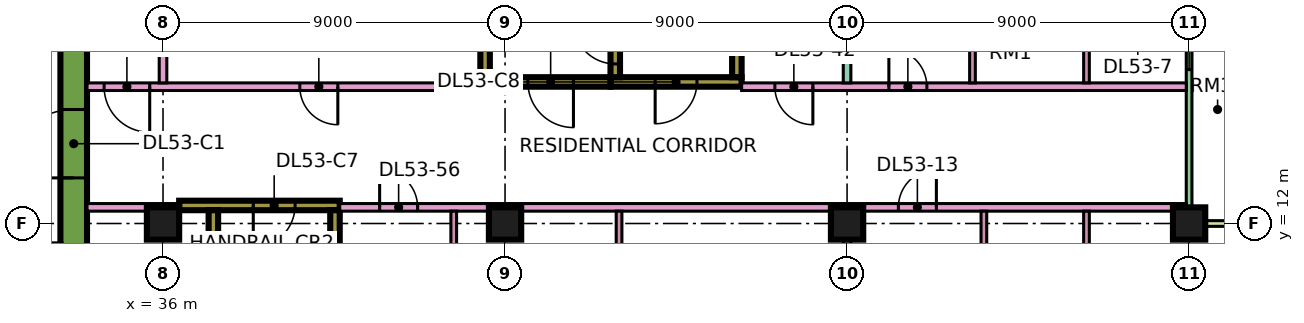
"""IFC4 building model, lengths in metres.
Left out: names, types, materials, properties, quantities, classifications, styles, units other than length and angle.
Written with IfcOpenShell. Run it as: python <this file> out.ifc"""

import sys

from ifc_helpers import new_model, si_unit, direction, frame, frame_2d, origin, origin_2d, place, context, subcontext, project, spatial, rectangle, extrude, element, fill, save


model = new_model("IFC4")
c1 = context("Model", 3, precision=1e-05, world=origin(), true_north=direction((0.0, 1.0)))
c2 = subcontext(c1, "Body", "Model", "MODEL_VIEW")
j1 = project(units=[si_unit("LENGTHUNIT", "METRE"), si_unit("PLANEANGLEUNIT", "RADIAN")], contexts=[c1])
p1 = place(None, origin())
s1 = spatial("IfcSite", under=j1, at=p1, CompositionType="ELEMENT")
p2 = place(p1, origin())
s2 = spatial("IfcBuilding", under=s1, at=p2, CompositionType="ELEMENT")
p3 = place(p2, frame((0.0, 0.0, 226.65)))
s3 = spatial("IfcBuildingStorey", under=s2, at=p3, CompositionType="ELEMENT", Elevation=226.65)
for number, where, z_axis, x_axis in (
    (1, (36.0, 12.0, 0.0), (0.0, 0.0, 1.0), (1.0, 0.0, 0.0)),
    (2, (45.0, 12.0, 0.0), (0.0, 0.0, 1.0), (1.0, 0.0, 0.0)),
    (3, (54.0, 12.0, 0.0), (0.0, 0.0, 1.0), (1.0, 0.0, 0.0)),
    (4, (63.0, 12.0, 0.0), (0.0, 0.0, 1.0), (1.0, 0.0, 0.0)),
):
    element("IfcColumn", number, at=place(p3, frame(where, z_axis=z_axis, x_axis=x_axis)), inside=s3, PredefinedType="COLUMN", context=c2, shape_type="SweptSolid", body=[
        extrude(rectangle(XDim=0.85, YDim=0.85, at=origin_2d()), origin(), (0.0, 0.0, 1.0), 3.75),
    ])
p4 = place(p3, frame((33.65, 7.7, 0.0), z_axis=(0.0, 0.0, 1.0), x_axis=(0.0, 1.0, 0.0)))
e5 = element("IfcWall", 5, at=p4, inside=s3, PredefinedType="SHEAR", context=c2, shape_type="SweptSolid", body=[
    extrude(rectangle(XDim=11.6, YDim=0.7, at=frame_2d((5.8, 0.0))), origin(), (0.0, 0.0, 1.0), 3.75),
])
p5 = place(p4, frame((5.5, 0.0, 0.0)))
e6 = element("IfcOpeningElement", 6, at=p5, cuts=e5, PredefinedType="OPENING", context=c2, shape_type="SweptSolid", body=[
    extrude(rectangle(XDim=1.8, YDim=2.4, at=frame_2d((0.9, 1.2))), frame((0.0, 0.36, 0.0), z_axis=(0.0, -1.0, 0.0), x_axis=(1.0, 0.0, 0.0)), (0.0, 0.0, 1.0), 0.72),
])
p6 = place(p3, frame((36.425, 12.475, 0.0), z_axis=(0.0, 0.0, 1.0), x_axis=(1.0, 0.0, 0.0)))
e7 = element("IfcWall", 7, at=p6, inside=s3, PredefinedType="SHEAR", context=c2, shape_type="SweptSolid", body=[
    extrude(rectangle(XDim=4.225, YDim=0.25, at=frame_2d((2.112, 0.0))), origin(), (0.0, 0.0, 1.0), 3.75),
])
p7 = place(p6, frame((1.95, 0.0, 0.0)))
e8 = element("IfcOpeningElement", 8, at=p7, cuts=e7, PredefinedType="OPENING", context=c2, shape_type="SweptSolid", body=[
    extrude(rectangle(XDim=1.1, YDim=2.2, at=frame_2d((0.55, 1.1))), frame((0.0, 0.135, 0.0), z_axis=(0.0, -1.0, 0.0), x_axis=(1.0, 0.0, 0.0)), (0.0, 0.0, 1.0), 0.27),
])
for number, where, z_axis, x_axis in (
    (9, (37.325, 5.85, 0.0), (0.0, 0.0, 1.0), (0.0, 1.0, 0.0)),
    (10, (40.525, 5.85, 0.0), (0.0, 0.0, 1.0), (0.0, 1.0, 0.0)),
):
    element("IfcWall", number, at=place(p3, frame(where, z_axis=z_axis, x_axis=x_axis)), inside=s3, PredefinedType="SHEAR", context=c2, shape_type="SweptSolid", body=[
        extrude(rectangle(XDim=6.5, YDim=0.25, at=frame_2d((3.25, 0.0))), origin(), (0.0, 0.0, 1.0), 3.75),
    ])
p8 = place(p3, frame((47.775, 15.725, 0.0), z_axis=(0.0, 0.0, 1.0), x_axis=(1.0, 0.0, 0.0)))
e11 = element("IfcWall", 11, at=p8, inside=s3, PredefinedType="SHEAR", context=c2, shape_type="SweptSolid", body=[
    extrude(rectangle(XDim=3.45, YDim=0.25, at=frame_2d((1.725, 0.0))), origin(), (0.0, 0.0, 1.0), 3.75),
])
p9 = place(p8, frame((1.175, 0.0, 0.0)))
e12 = element("IfcOpeningElement", 12, at=p9, cuts=e11, PredefinedType="OPENING", context=c2, shape_type="SweptSolid", body=[
    extrude(rectangle(XDim=1.1, YDim=2.2, at=frame_2d((0.55, 1.1))), frame((0.0, 0.135, 0.0), z_axis=(0.0, -1.0, 0.0), x_axis=(1.0, 0.0, 0.0)), (0.0, 0.0, 1.0), 0.27),
])
p10 = place(p3, frame((47.9, 15.85, 0.0), z_axis=(0.0, 0.0, 1.0), x_axis=(0.0, 1.0, 0.0)))
e13 = element("IfcWall", 13, at=p10, inside=s3, PredefinedType="SHEAR", context=c2, shape_type="SweptSolid", body=[
    extrude(rectangle(XDim=6.5, YDim=0.25, at=frame_2d((3.25, 0.0))), origin(), (0.0, 0.0, 1.0), 3.75),
])
p11 = place(p10, frame((0.35, 0.0, 0.0)))
e14 = element("IfcOpeningElement", 14, at=p11, cuts=e13, PredefinedType="OPENING", context=c2, shape_type="SweptSolid", body=[
    extrude(rectangle(XDim=1.1, YDim=2.2, at=frame_2d((0.55, 1.1))), frame((0.0, 0.135, 0.0), z_axis=(0.0, -1.0, 0.0), x_axis=(1.0, 0.0, 0.0)), (0.0, 0.0, 1.0), 0.27),
])
p12 = place(p3, frame((51.1, 15.85, 0.0), z_axis=(0.0, 0.0, 1.0), x_axis=(0.0, 1.0, 0.0)))
e15 = element("IfcWall", 15, at=p12, inside=s3, PredefinedType="SHEAR", context=c2, shape_type="SweptSolid", body=[
    extrude(rectangle(XDim=6.5, YDim=0.25, at=frame_2d((3.25, 0.0))), origin(), (0.0, 0.0, 1.0), 3.75),
])
p13 = place(p3, frame((44.35, 15.725, 0.0), z_axis=(0.0, 0.0, 1.0), x_axis=(1.0, 0.0, 0.0)))
e16 = element("IfcWall", 16, at=p13, inside=s3, PredefinedType="SHEAR", context=c2, shape_type="SweptSolid", body=[
    extrude(rectangle(XDim=3.425, YDim=0.25, at=frame_2d((1.712, 0.0))), origin(), (0.0, 0.0, 1.0), 3.75),
])
p14 = place(p13, frame((1.25, 0.0, 0.0)))
e17 = element("IfcOpeningElement", 17, at=p14, cuts=e16, PredefinedType="OPENING", context=c2, shape_type="SweptSolid", body=[
    extrude(rectangle(XDim=1.2, YDim=2.2, at=frame_2d((0.6, 1.1))), frame((0.0, 0.135, 0.0), z_axis=(0.0, -1.0, 0.0), x_axis=(1.0, 0.0, 0.0)), (0.0, 0.0, 1.0), 0.27),
])
p15 = place(p3, frame((44.475, 15.85, 0.0), z_axis=(0.0, 0.0, 1.0), x_axis=(0.0, 1.0, 0.0)))
e18 = element("IfcWall", 18, at=p15, inside=s3, PredefinedType="SHEAR", context=c2, shape_type="SweptSolid", body=[
    extrude(rectangle(XDim=6.5, YDim=0.25, at=frame_2d((3.25, 0.0))), origin(), (0.0, 0.0, 1.0), 3.75),
])
p16 = place(p15, frame((1.75, 0.0, 0.0)))
e19 = element("IfcOpeningElement", 19, at=p16, cuts=e18, PredefinedType="OPENING", context=c2, shape_type="SweptSolid", body=[
    extrude(rectangle(XDim=1.1, YDim=2.2, at=frame_2d((0.55, 1.1))), frame((0.0, 0.135, 0.0), z_axis=(0.0, -1.0, 0.0), x_axis=(1.0, 0.0, 0.0)), (0.0, 0.0, 1.0), 0.27),
])
p17 = place(p15, frame((4.3, 0.0, 0.0)))
e20 = element("IfcOpeningElement", 20, at=p17, cuts=e18, PredefinedType="OPENING", context=c2, shape_type="SweptSolid", body=[
    extrude(rectangle(XDim=1.1, YDim=2.2, at=frame_2d((0.55, 1.1))), frame((0.0, 0.135, 0.0), z_axis=(0.0, -1.0, 0.0), x_axis=(1.0, 0.0, 0.0)), (0.0, 0.0, 1.0), 0.27),
])
p18 = place(p3, frame((63.0, 12.075, 0.0), z_axis=(0.0, 0.0, 1.0), x_axis=(0.0, 1.0, 0.0)))
e21 = element("IfcWall", 21, at=p18, inside=s3, PredefinedType="SOLIDWALL", context=c2, shape_type="SweptSolid", body=[
    extrude(rectangle(XDim=10.35, YDim=0.15, at=frame_2d((5.175, 0.0))), origin(), (0.0, 0.0, 1.0), 3.35),
])
p19 = place(p18, frame((3.975, 0.0, 0.45)))
e22 = element("IfcOpeningElement", 22, at=p19, cuts=e21, PredefinedType="OPENING", context=c2, shape_type="SweptSolid", body=[
    extrude(rectangle(XDim=1.8, YDim=2.4, at=frame_2d((0.9, 1.2))), frame((0.0, 0.085, 0.0), z_axis=(0.0, -1.0, 0.0), x_axis=(1.0, 0.0, 0.0)), (0.0, 0.0, 1.0), 0.17),
])
p20 = place(p18, frame((7.387, 0.0, 0.0)))
e23 = element("IfcOpeningElement", 23, at=p20, cuts=e21, PredefinedType="OPENING", context=c2, shape_type="SweptSolid", body=[
    extrude(rectangle(XDim=1.8, YDim=2.4, at=frame_2d((0.9, 1.2))), frame((0.0, 0.085, 0.0), z_axis=(0.0, -1.0, 0.0), x_axis=(1.0, 0.0, 0.0)), (0.0, 0.0, 1.0), 0.17),
])
p21 = place(p3, frame((64.5, 12.0, 0.0), z_axis=(0.0, 0.0, 1.0), x_axis=(-1.0, 0.0, 0.0)))
e24 = element("IfcWall", 24, at=p21, inside=s3, PredefinedType="SOLIDWALL", context=c2, shape_type="SweptSolid", body=[
    extrude(rectangle(XDim=1.5, YDim=0.15, at=frame_2d((0.75, 0.0))), origin(), (0.0, 0.0, 1.0), 3.35),
])
p22 = place(p3, frame((34.0, 12.425, 0.0), z_axis=(0.0, 0.0, 1.0), x_axis=(1.0, 0.0, 0.0)))
e25 = element("IfcWall", 25, at=p22, inside=s3, PredefinedType="PARTITIONING", context=c2, shape_type="SweptSolid", body=[
    extrude(rectangle(XDim=2.426, YDim=0.2, at=frame_2d((1.213, 0.0))), origin(), (0.0, 0.0, 1.0), 3.35),
])
p23 = place(p3, frame((34.0, 15.6, 0.0), z_axis=(0.0, 0.0, 1.0), x_axis=(1.0, 0.0, 0.0)))
e26 = element("IfcWall", 26, at=p23, inside=s3, PredefinedType="PARTITIONING", context=c2, shape_type="SweptSolid", body=[
    extrude(rectangle(XDim=10.35, YDim=0.2, at=frame_2d((5.175, 0.0))), origin(), (0.0, 0.0, 1.0), 3.35),
])
p24 = place(p23, frame((5.6, 0.0, 0.0)))
e27 = element("IfcOpeningElement", 27, at=p24, cuts=e26, PredefinedType="OPENING", context=c2, shape_type="SweptSolid", body=[
    extrude(rectangle(XDim=1.0, YDim=2.1, at=frame_2d((0.5, 1.05))), frame((0.0, 0.11, 0.0), z_axis=(0.0, -1.0, 0.0), x_axis=(1.0, 0.0, 0.0)), (0.0, 0.0, 1.0), 0.22),
])
p25 = place(p23, frame((0.45, 0.0, 0.0)))
e28 = element("IfcOpeningElement", 28, at=p25, cuts=e26, PredefinedType="OPENING", context=c2, shape_type="SweptSolid", body=[
    extrude(rectangle(XDim=1.2, YDim=2.1, at=frame_2d((0.6, 1.05))), frame((0.0, 0.11, 0.0), z_axis=(0.0, -1.0, 0.0), x_axis=(1.0, 0.0, 0.0)), (0.0, 0.0, 1.0), 0.22),
])
p26 = place(p3, frame((36.0, 15.7, 0.0), z_axis=(0.0, 0.0, 1.0), x_axis=(0.0, 1.0, 0.0)))
e29 = element("IfcWall", 29, at=p26, inside=s3, PredefinedType="PARTITIONING", context=c2, shape_type="SweptSolid", body=[
    extrude(rectangle(XDim=8.3, YDim=0.2, at=frame_2d((4.15, 0.0))), origin(), (0.0, 0.0, 1.0), 3.35),
])
p27 = place(p3, frame((40.65, 12.425, 0.0), z_axis=(0.0, 0.0, 1.0), x_axis=(1.0, 0.0, 0.0)))
e30 = element("IfcWall", 30, at=p27, inside=s3, PredefinedType="PARTITIONING", context=c2, shape_type="SweptSolid", body=[
    extrude(rectangle(XDim=22.276, YDim=0.2, at=frame_2d((11.138, 0.0))), origin(), (0.0, 0.0, 1.0), 3.35),
])
p28 = place(p27, frame((14.7, 0.0, 0.0)))
e31 = element("IfcOpeningElement", 31, at=p28, cuts=e30, PredefinedType="OPENING", context=c2, shape_type="SweptSolid", body=[
    extrude(rectangle(XDim=1.0, YDim=2.1, at=frame_2d((0.5, 1.05))), frame((0.0, 0.11, 0.0), z_axis=(0.0, -1.0, 0.0), x_axis=(1.0, 0.0, 0.0)), (0.0, 0.0, 1.0), 0.22),
])
p29 = place(p27, frame((1.05, 0.0, 0.0)))
e32 = element("IfcOpeningElement", 32, at=p29, cuts=e30, PredefinedType="OPENING", context=c2, shape_type="SweptSolid", body=[
    extrude(rectangle(XDim=1.0, YDim=2.1, at=frame_2d((0.5, 1.05))), frame((0.0, 0.11, 0.0), z_axis=(0.0, -1.0, 0.0), x_axis=(1.0, 0.0, 0.0)), (0.0, 0.0, 1.0), 0.22),
])
p30 = place(p3, frame((43.65, 5.975, 0.0), z_axis=(0.0, 0.0, 1.0), x_axis=(0.0, 1.0, 0.0)))
e33 = element("IfcWall", 33, at=p30, inside=s3, PredefinedType="PARTITIONING", context=c2, shape_type="SweptSolid", body=[
    extrude(rectangle(XDim=6.35, YDim=0.15, at=frame_2d((3.175, 0.0))), origin(), (0.0, 0.0, 1.0), 3.35),
])
p31 = place(p30, frame((4.275, 0.0, 0.0)))
e34 = element("IfcOpeningElement", 34, at=p31, cuts=e33, PredefinedType="OPENING", context=c2, shape_type="SweptSolid", body=[
    extrude(rectangle(XDim=0.9, YDim=2.1, at=frame_2d((0.45, 1.05))), frame((0.0, 0.085, 0.0), z_axis=(0.0, -1.0, 0.0), x_axis=(1.0, 0.0, 0.0)), (0.0, 0.0, 1.0), 0.17),
])
p32 = place(p3, frame((48.0, 5.975, 0.0), z_axis=(0.0, 0.0, 1.0), x_axis=(0.0, 1.0, 0.0)))
e35 = element("IfcWall", 35, at=p32, inside=s3, PredefinedType="PARTITIONING", context=c2, shape_type="SweptSolid", body=[
    extrude(rectangle(XDim=6.35, YDim=0.15, at=frame_2d((3.175, 0.0))), origin(), (0.0, 0.0, 1.0), 3.35),
])
p33 = place(p3, frame((51.225, 15.6, 0.0), z_axis=(0.0, 0.0, 1.0), x_axis=(1.0, 0.0, 0.0)))
e36 = element("IfcWall", 36, at=p33, inside=s3, PredefinedType="PARTITIONING", context=c2, shape_type="SweptSolid", body=[
    extrude(rectangle(XDim=11.701, YDim=0.2, at=frame_2d((5.851, 0.0))), origin(), (0.0, 0.0, 1.0), 3.35),
])
p34 = place(p33, frame((3.875, 0.0, 0.0)))
e37 = element("IfcOpeningElement", 37, at=p34, cuts=e36, PredefinedType="OPENING", context=c2, shape_type="SweptSolid", body=[
    extrude(rectangle(XDim=1.0, YDim=2.1, at=frame_2d((0.5, 1.05))), frame((0.0, 0.11, 0.0), z_axis=(0.0, -1.0, 0.0), x_axis=(1.0, 0.0, 0.0)), (0.0, 0.0, 1.0), 0.22),
])
p35 = place(p33, frame((0.875, 0.0, 0.0)))
e38 = element("IfcOpeningElement", 38, at=p35, cuts=e36, PredefinedType="OPENING", context=c2, shape_type="SweptSolid", body=[
    extrude(rectangle(XDim=1.0, YDim=2.1, at=frame_2d((0.5, 1.05))), frame((0.0, 0.11, 0.0), z_axis=(0.0, -1.0, 0.0), x_axis=(1.0, 0.0, 0.0)), (0.0, 0.0, 1.0), 0.22),
])
p36 = place(p3, frame((54.0, -1.351, 0.0), z_axis=(0.0, 0.0, 1.0), x_axis=(0.0, 1.0, 0.0)))
e39 = element("IfcWall", 39, at=p36, inside=s3, PredefinedType="PARTITIONING", context=c2, shape_type="SweptSolid", body=[
    extrude(rectangle(XDim=13.676, YDim=0.2, at=frame_2d((6.838, 0.0))), origin(), (0.0, 0.0, 1.0), 3.35),
])
p37 = place(p3, frame((54.0, 15.7, 0.0), z_axis=(0.0, 0.0, 1.0), x_axis=(0.0, 1.0, 0.0)))
e40 = element("IfcWall", 40, at=p37, inside=s3, PredefinedType="PARTITIONING", context=c2, shape_type="SweptSolid", body=[
    extrude(rectangle(XDim=8.3, YDim=0.2, at=frame_2d((4.15, 0.0))), origin(), (0.0, 0.0, 1.0), 3.35),
])
p38 = place(p3, frame((57.3, 15.7, 0.0), z_axis=(0.0, 0.0, 1.0), x_axis=(0.0, 1.0, 0.0)))
e41 = element("IfcWall", 41, at=p38, inside=s3, PredefinedType="PARTITIONING", context=c2, shape_type="SweptSolid", body=[
    extrude(rectangle(XDim=2.525, YDim=0.15, at=frame_2d((1.263, 0.0))), origin(), (0.0, 0.0, 1.0), 3.35),
])
for number, where, z_axis, x_axis in (
    (42, (57.6, 7.7, 0.0), (0.0, 0.0, 1.0), (0.0, 1.0, 0.0)),
    (43, (60.3, 7.7, 0.0), (0.0, 0.0, 1.0), (0.0, 1.0, 0.0)),
):
    element("IfcWall", number, at=place(p3, frame(where, z_axis=z_axis, x_axis=x_axis)), inside=s3, PredefinedType="PARTITIONING", context=c2, shape_type="SweptSolid", body=[
        extrude(rectangle(XDim=4.625, YDim=0.15, at=frame_2d((2.312, 0.0))), origin(), (0.0, 0.0, 1.0), 3.35),
    ])
p39 = place(p3, frame((60.3, 15.7, 0.0), z_axis=(0.0, 0.0, 1.0), x_axis=(0.0, 1.0, 0.0)))
e44 = element("IfcWall", 44, at=p39, inside=s3, PredefinedType="PARTITIONING", context=c2, shape_type="SweptSolid", body=[
    extrude(rectangle(XDim=2.525, YDim=0.15, at=frame_2d((1.263, 0.0))), origin(), (0.0, 0.0, 1.0), 3.35),
])
p40 = place(p19, origin())
e45 = element("IfcWindow", 45, at=p40, inside=s3, PartitioningType="SINGLE_PANEL", PredefinedType="WINDOW", context=c2, shape_type="SweptSolid", body=[
    extrude(rectangle(XDim=1.8, YDim=2.4, at=frame_2d((0.9, 1.2))), frame((0.0, 0.03, 0.0), z_axis=(0.0, -1.0, 0.0), x_axis=(1.0, 0.0, 0.0)), (0.0, 0.0, 1.0), 0.06),
])
fill(e22, e45)
p41 = place(p5, origin())
e46 = element("IfcDoor", 46, at=p41, inside=s3, OperationType="DOUBLE_DOOR_SINGLE_SWING", PredefinedType="DOOR", context=c2, shape_type="SweptSolid", body=[
    extrude(rectangle(XDim=1.8, YDim=2.4, at=frame_2d((0.9, 1.2))), frame((0.0, 0.025, 0.0), z_axis=(0.0, -1.0, 0.0), x_axis=(1.0, 0.0, 0.0)), (0.0, 0.0, 1.0), 0.05),
])
fill(e6, e46)
p42 = place(p7, frame((1.1, 0.0, 0.0), z_axis=(0.0, 0.0, 1.0), x_axis=(-1.0, 0.0, 0.0)))
e47 = element("IfcDoor", 47, at=p42, inside=s3, OperationType="SINGLE_SWING_LEFT", PredefinedType="DOOR", context=c2, shape_type="SweptSolid", body=[
    extrude(rectangle(XDim=1.1, YDim=2.2, at=frame_2d((0.55, 1.1))), frame((0.0, 0.025, 0.0), z_axis=(0.0, -1.0, 0.0), x_axis=(1.0, 0.0, 0.0)), (0.0, 0.0, 1.0), 0.05),
])
fill(e8, e47)
p43 = place(p9, frame((1.1, 0.0, 0.0), z_axis=(0.0, 0.0, 1.0), x_axis=(-1.0, 0.0, 0.0)))
e48 = element("IfcDoor", 48, at=p43, inside=s3, OperationType="SINGLE_SWING_LEFT", PredefinedType="DOOR", context=c2, shape_type="SweptSolid", body=[
    extrude(rectangle(XDim=1.1, YDim=2.2, at=frame_2d((0.55, 1.1))), frame((0.0, 0.025, 0.0), z_axis=(0.0, -1.0, 0.0), x_axis=(1.0, 0.0, 0.0)), (0.0, 0.0, 1.0), 0.05),
])
fill(e12, e48)
p44 = place(p14, origin())
e49 = element("IfcDoor", 49, at=p44, inside=s3, OperationType="SINGLE_SWING_RIGHT", PredefinedType="DOOR", context=c2, shape_type="SweptSolid", body=[
    extrude(rectangle(XDim=1.2, YDim=2.2, at=frame_2d((0.6, 1.1))), frame((0.0, 0.025, 0.0), z_axis=(0.0, -1.0, 0.0), x_axis=(1.0, 0.0, 0.0)), (0.0, 0.0, 1.0), 0.05),
])
fill(e17, e49)
p45 = place(p11, frame((1.1, 0.0, 0.0), z_axis=(0.0, 0.0, 1.0), x_axis=(-1.0, 0.0, 0.0)))
e50 = element("IfcDoor", 50, at=p45, inside=s3, OperationType="SINGLE_SWING_RIGHT", PredefinedType="DOOR", context=c2, shape_type="SweptSolid", body=[
    extrude(rectangle(XDim=1.1, YDim=2.2, at=frame_2d((0.55, 1.1))), frame((0.0, 0.025, 0.0), z_axis=(0.0, -1.0, 0.0), x_axis=(1.0, 0.0, 0.0)), (0.0, 0.0, 1.0), 0.05),
])
fill(e14, e50)
p46 = place(p24, origin())
e51 = element("IfcDoor", 51, at=p46, inside=s3, OperationType="SINGLE_SWING_RIGHT", PredefinedType="DOOR", context=c2, shape_type="SweptSolid", body=[
    extrude(rectangle(XDim=1.0, YDim=2.1, at=frame_2d((0.5, 1.05))), frame((0.0, 0.025, 0.0), z_axis=(0.0, -1.0, 0.0), x_axis=(1.0, 0.0, 0.0)), (0.0, 0.0, 1.0), 0.05),
])
fill(e27, e51)
p47 = place(p34, origin())
e52 = element("IfcDoor", 52, at=p47, inside=s3, OperationType="SINGLE_SWING_LEFT", PredefinedType="DOOR", context=c2, shape_type="SweptSolid", body=[
    extrude(rectangle(XDim=1.0, YDim=2.1, at=frame_2d((0.5, 1.05))), frame((0.0, 0.025, 0.0), z_axis=(0.0, -1.0, 0.0), x_axis=(1.0, 0.0, 0.0)), (0.0, 0.0, 1.0), 0.05),
])
fill(e37, e52)
p48 = place(p28, frame((1.0, 0.0, 0.0), z_axis=(0.0, 0.0, 1.0), x_axis=(-1.0, 0.0, 0.0)))
e53 = element("IfcDoor", 53, at=p48, inside=s3, OperationType="SINGLE_SWING_RIGHT", PredefinedType="DOOR", context=c2, shape_type="SweptSolid", body=[
    extrude(rectangle(XDim=1.0, YDim=2.1, at=frame_2d((0.5, 1.05))), frame((0.0, 0.025, 0.0), z_axis=(0.0, -1.0, 0.0), x_axis=(1.0, 0.0, 0.0)), (0.0, 0.0, 1.0), 0.05),
])
fill(e31, e53)
p49 = place(p25, origin())
e54 = element("IfcDoor", 54, at=p49, inside=s3, OperationType="SINGLE_SWING_RIGHT", PredefinedType="DOOR", context=c2, shape_type="SweptSolid", body=[
    extrude(rectangle(XDim=1.2, YDim=2.1, at=frame_2d((0.6, 1.05))), frame((0.0, 0.025, 0.0), z_axis=(0.0, -1.0, 0.0), x_axis=(1.0, 0.0, 0.0)), (0.0, 0.0, 1.0), 0.05),
])
fill(e28, e54)
p50 = place(p35, origin())
e55 = element("IfcDoor", 55, at=p50, inside=s3, OperationType="SINGLE_SWING_RIGHT", PredefinedType="DOOR", context=c2, shape_type="SweptSolid", body=[
    extrude(rectangle(XDim=1.0, YDim=2.1, at=frame_2d((0.5, 1.05))), frame((0.0, 0.025, 0.0), z_axis=(0.0, -1.0, 0.0), x_axis=(1.0, 0.0, 0.0)), (0.0, 0.0, 1.0), 0.05),
])
fill(e38, e55)
p51 = place(p29, origin())
e56 = element("IfcDoor", 56, at=p51, inside=s3, OperationType="SINGLE_SWING_LEFT", PredefinedType="DOOR", context=c2, shape_type="SweptSolid", body=[
    extrude(rectangle(XDim=1.0, YDim=2.1, at=frame_2d((0.5, 1.05))), frame((0.0, 0.025, 0.0), z_axis=(0.0, -1.0, 0.0), x_axis=(1.0, 0.0, 0.0)), (0.0, 0.0, 1.0), 0.05),
])
fill(e32, e56)
save(model, sys.argv[1])
